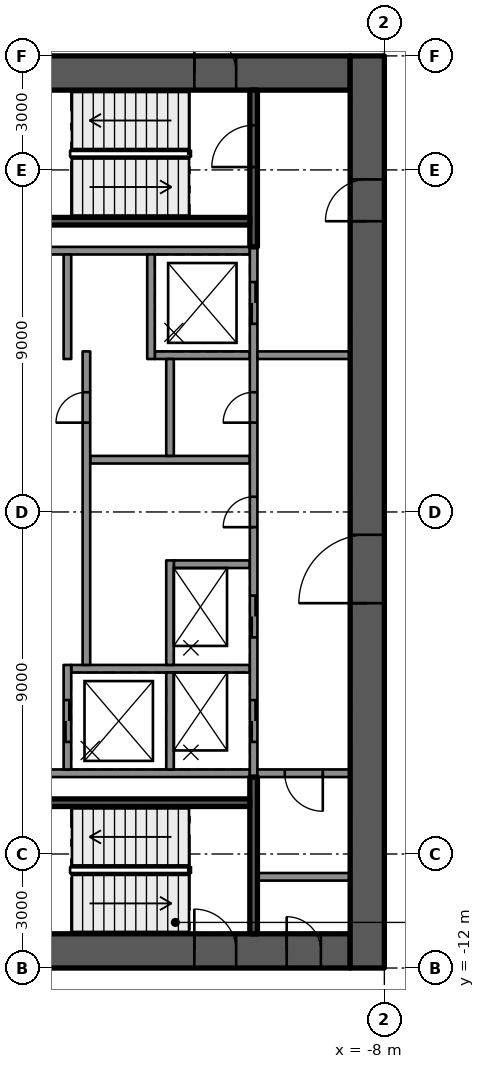
"""IFC4 building model, lengths in metres.
Left out: names, types, materials, properties, quantities, classifications, styles, units other than length and angle.
Written with IfcOpenShell. Run it as: python <this file> out.ifc"""

import sys

from ifc_helpers import new_model, si_unit, direction, frame, frame_2d, origin, place, context, subcontext, project, spatial, rectangle, extrude, element, fill, save


model = new_model("IFC4")
c1 = context("Model", 3, precision=1e-05, world=origin(), true_north=direction((0.0, 1.0)))
c2 = subcontext(c1, "Body", "Model", "MODEL_VIEW")
j1 = project(units=[si_unit("LENGTHUNIT", "METRE"), si_unit("PLANEANGLEUNIT", "RADIAN")], contexts=[c1])
p1 = place(None, origin())
s1 = spatial("IfcSite", under=j1, at=p1, CompositionType="ELEMENT")
p2 = place(p1, origin())
s2 = spatial("IfcBuilding", under=s1, at=p2, CompositionType="ELEMENT")
p3 = place(p2, frame((0.0, 0.0, 249.5)))
s3 = spatial("IfcBuildingStorey", under=s2, at=p3, CompositionType="ELEMENT", Elevation=249.5)
p4 = place(p3, frame((-18.1, 11.55, 0.0), z_axis=(0.0, 0.0, 1.0), x_axis=(1.0, 0.0, 0.0)))
e1 = element("IfcWall", 1, at=p4, inside=s3, PredefinedType="SHEAR", context=c2, shape_type="SweptSolid", body=[
    extrude(rectangle(XDim=9.2, YDim=0.9, at=frame_2d((4.6, 0.0))), origin(), (0.0, 0.0, 1.0), 4.0),
])
p5 = place(p4, frame((5.1, 0.0, 0.0)))
e2 = element("IfcOpeningElement", 2, at=p5, cuts=e1, PredefinedType="OPENING", context=c2, shape_type="SweptSolid", body=[
    extrude(rectangle(XDim=1.1, YDim=2.1, at=frame_2d((0.55, 1.05))), frame((0.0, 0.46, 0.0), z_axis=(0.0, -1.0, 0.0), x_axis=(1.0, 0.0, 0.0)), (0.0, 0.0, 1.0), 0.92),
])
p6 = place(p3, frame((-18.1, -11.55, 0.0), z_axis=(0.0, 0.0, 1.0), x_axis=(1.0, 0.0, 0.0)))
e3 = element("IfcWall", 3, at=p6, inside=s3, PredefinedType="SHEAR", context=c2, shape_type="SweptSolid", body=[
    extrude(rectangle(XDim=9.2, YDim=0.9, at=frame_2d((4.6, 0.0))), origin(), (0.0, 0.0, 1.0), 4.0),
])
p7 = place(p6, frame((5.1, 0.0, 0.0)))
e4 = element("IfcOpeningElement", 4, at=p7, cuts=e3, PredefinedType="OPENING", context=c2, shape_type="SweptSolid", body=[
    extrude(rectangle(XDim=1.1, YDim=2.1, at=frame_2d((0.55, 1.05))), frame((0.0, 0.46, 0.0), z_axis=(0.0, -1.0, 0.0), x_axis=(1.0, 0.0, 0.0)), (0.0, 0.0, 1.0), 0.92),
])
p8 = place(p6, frame((7.53, 0.0, 0.0)))
e5 = element("IfcOpeningElement", 5, at=p8, cuts=e3, PredefinedType="OPENING", context=c2, shape_type="SweptSolid", body=[
    extrude(rectangle(XDim=0.9, YDim=2.1, at=frame_2d((0.45, 1.05))), frame((0.0, 0.46, 0.0), z_axis=(0.0, -1.0, 0.0), x_axis=(1.0, 0.0, 0.0)), (0.0, 0.0, 1.0), 0.92),
])
p9 = place(p3, frame((-8.45, -12.0, 0.0), z_axis=(0.0, 0.0, 1.0), x_axis=(0.0, 1.0, 0.0)))
e6 = element("IfcWall", 6, at=p9, inside=s3, PredefinedType="SHEAR", context=c2, shape_type="SweptSolid", body=[
    extrude(rectangle(XDim=24.0, YDim=0.9, at=frame_2d((12.0, 0.0))), origin(), (0.0, 0.0, 1.0), 4.0),
])
p10 = place(p9, frame((9.6, 0.0, 0.0)))
e7 = element("IfcOpeningElement", 7, at=p10, cuts=e6, PredefinedType="OPENING", context=c2, shape_type="SweptSolid", body=[
    extrude(rectangle(XDim=1.8, YDim=2.1, at=frame_2d((0.9, 1.05))), frame((0.0, 0.46, 0.0), z_axis=(0.0, -1.0, 0.0), x_axis=(1.0, 0.0, 0.0)), (0.0, 0.0, 1.0), 0.92),
])
p11 = place(p9, frame((19.65, 0.0, 0.0)))
e8 = element("IfcOpeningElement", 8, at=p11, cuts=e6, PredefinedType="OPENING", context=c2, shape_type="SweptSolid", body=[
    extrude(rectangle(XDim=1.1, YDim=2.1, at=frame_2d((0.55, 1.05))), frame((0.0, 0.46, 0.0), z_axis=(0.0, -1.0, 0.0), x_axis=(1.0, 0.0, 0.0)), (0.0, 0.0, 1.0), 0.92),
])
for number, where, z_axis, x_axis in (
    (9, (-11.54, 6.875, 0.0), (0.0, 0.0, 1.0), (-1.0, 0.0, 0.0)),
    (10, (-11.54, -6.875, 0.0), (0.0, 0.0, 1.0), (-1.0, 0.0, 0.0)),
):
    element("IfcWall", number, at=place(p3, frame(where, z_axis=z_axis, x_axis=x_axis)), inside=s3, PredefinedType="SOLIDWALL", context=c2, shape_type="SweptSolid", body=[
        extrude(rectangle(XDim=6.56, YDim=0.2, at=frame_2d((3.28, 0.0))), origin(), (0.0, 0.0, 1.0), 3.58),
    ])
p12 = place(p3, frame((-11.54, -4.125, 0.0), z_axis=(0.0, 0.0, 1.0), x_axis=(-1.0, 0.0, 0.0)))
e11 = element("IfcWall", 11, at=p12, inside=s3, PredefinedType="SOLIDWALL", context=c2, shape_type="SweptSolid", body=[
    extrude(rectangle(XDim=4.7, YDim=0.2, at=frame_2d((2.35, 0.0))), origin(), (0.0, 0.0, 1.0), 3.58),
])
p13 = place(p3, frame((-11.54, -1.375, 0.0), z_axis=(0.0, 0.0, 1.0), x_axis=(-1.0, 0.0, 0.0)))
e12 = element("IfcWall", 12, at=p13, inside=s3, PredefinedType="SOLIDWALL", context=c2, shape_type="SweptSolid", body=[
    extrude(rectangle(XDim=2.0, YDim=0.2, at=frame_2d((1.0, 0.0))), origin(), (0.0, 0.0, 1.0), 3.58),
])
p14 = place(p3, frame((-11.54, 1.375, 0.0), z_axis=(0.0, 0.0, 1.0), x_axis=(-1.0, 0.0, 0.0)))
e13 = element("IfcWall", 13, at=p14, inside=s3, PredefinedType="SOLIDWALL", context=c2, shape_type="SweptSolid", body=[
    extrude(rectangle(XDim=4.2, YDim=0.2, at=frame_2d((2.1, 0.0))), origin(), (0.0, 0.0, 1.0), 3.58),
])
p15 = place(p3, frame((-11.54, 4.125, 0.0), z_axis=(0.0, 0.0, 1.0), x_axis=(-1.0, 0.0, 0.0)))
e14 = element("IfcWall", 14, at=p15, inside=s3, PredefinedType="SOLIDWALL", context=c2, shape_type="SweptSolid", body=[
    extrude(rectangle(XDim=2.5, YDim=0.2, at=frame_2d((1.25, 0.0))), origin(), (0.0, 0.0, 1.0), 3.58),
])
p16 = place(p3, frame((-11.44, -6.975, 0.0), z_axis=(0.0, 0.0, 1.0), x_axis=(0.0, 1.0, 0.0)))
e15 = element("IfcWall", 15, at=p16, inside=s3, PredefinedType="SOLIDWALL", context=c2, shape_type="SweptSolid", body=[
    extrude(rectangle(XDim=13.95, YDim=0.2, at=frame_2d((6.975, 0.0))), origin(), (0.0, 0.0, 1.0), 3.58),
])
p17 = place(p16, frame((0.925, 0.0, 0.0)))
e16 = element("IfcOpeningElement", 16, at=p17, cuts=e15, PredefinedType="OPENING", context=c2, shape_type="SweptSolid", body=[
    extrude(rectangle(XDim=1.1, YDim=2.1, at=frame_2d((0.55, 1.05))), frame((0.0, 0.11, 0.0), z_axis=(0.0, -1.0, 0.0), x_axis=(1.0, 0.0, 0.0)), (0.0, 0.0, 1.0), 0.22),
])
p18 = place(p16, frame((3.675, 0.0, 0.0)))
e17 = element("IfcOpeningElement", 17, at=p18, cuts=e15, PredefinedType="OPENING", context=c2, shape_type="SweptSolid", body=[
    extrude(rectangle(XDim=1.1, YDim=2.1, at=frame_2d((0.55, 1.05))), frame((0.0, 0.11, 0.0), z_axis=(0.0, -1.0, 0.0), x_axis=(1.0, 0.0, 0.0)), (0.0, 0.0, 1.0), 0.22),
])
p19 = place(p16, frame((11.925, 0.0, 0.0)))
e18 = element("IfcOpeningElement", 18, at=p19, cuts=e15, PredefinedType="OPENING", context=c2, shape_type="SweptSolid", body=[
    extrude(rectangle(XDim=1.1, YDim=2.1, at=frame_2d((0.55, 1.05))), frame((0.0, 0.11, 0.0), z_axis=(0.0, -1.0, 0.0), x_axis=(1.0, 0.0, 0.0)), (0.0, 0.0, 1.0), 0.22),
])
p20 = place(p16, frame((6.575, 0.0, 0.0)))
e19 = element("IfcOpeningElement", 19, at=p20, cuts=e15, PredefinedType="OPENING", context=c2, shape_type="SweptSolid", body=[
    extrude(rectangle(XDim=0.8, YDim=2.1, at=frame_2d((0.4, 1.05))), frame((0.0, 0.11, 0.0), z_axis=(0.0, -1.0, 0.0), x_axis=(1.0, 0.0, 0.0)), (0.0, 0.0, 1.0), 0.22),
])
p21 = place(p16, frame((9.325, 0.0, 0.0)))
e20 = element("IfcOpeningElement", 20, at=p21, cuts=e15, PredefinedType="OPENING", context=c2, shape_type="SweptSolid", body=[
    extrude(rectangle(XDim=0.8, YDim=2.1, at=frame_2d((0.4, 1.05))), frame((0.0, 0.11, 0.0), z_axis=(0.0, -1.0, 0.0), x_axis=(1.0, 0.0, 0.0)), (0.0, 0.0, 1.0), 0.22),
])
p22 = place(p3, frame((-13.64, -6.775, 0.0), z_axis=(0.0, 0.0, 1.0), x_axis=(0.0, 1.0, 0.0)))
e21 = element("IfcWall", 21, at=p22, inside=s3, PredefinedType="SOLIDWALL", context=c2, shape_type="SweptSolid", body=[
    extrude(rectangle(XDim=2.55, YDim=0.2, at=frame_2d((1.275, 0.0))), origin(), (0.0, 0.0, 1.0), 3.58),
])
p23 = place(p3, frame((-13.64, -4.025, 0.0), z_axis=(0.0, 0.0, 1.0), x_axis=(0.0, 1.0, 0.0)))
e22 = element("IfcWall", 22, at=p23, inside=s3, PredefinedType="SOLIDWALL", context=c2, shape_type="SweptSolid", body=[
    extrude(rectangle(XDim=2.75, YDim=0.2, at=frame_2d((1.375, 0.0))), origin(), (0.0, 0.0, 1.0), 3.58),
])
p24 = place(p3, frame((-13.64, 1.475, 0.0), z_axis=(0.0, 0.0, 1.0), x_axis=(0.0, 1.0, 0.0)))
e23 = element("IfcWall", 23, at=p24, inside=s3, PredefinedType="SOLIDWALL", context=c2, shape_type="SweptSolid", body=[
    extrude(rectangle(XDim=2.55, YDim=0.2, at=frame_2d((1.275, 0.0))), origin(), (0.0, 0.0, 1.0), 3.58),
])
p25 = place(p3, frame((-14.14, 4.025, 0.0), z_axis=(0.0, 0.0, 1.0), x_axis=(0.0, 1.0, 0.0)))
e24 = element("IfcWall", 24, at=p25, inside=s3, PredefinedType="SOLIDWALL", context=c2, shape_type="SweptSolid", body=[
    extrude(rectangle(XDim=2.75, YDim=0.2, at=frame_2d((1.375, 0.0))), origin(), (0.0, 0.0, 1.0), 3.58),
])
p26 = place(p3, frame((-16.34, -6.775, 0.0), z_axis=(0.0, 0.0, 1.0), x_axis=(0.0, 1.0, 0.0)))
e25 = element("IfcWall", 25, at=p26, inside=s3, PredefinedType="SOLIDWALL", context=c2, shape_type="SweptSolid", body=[
    extrude(rectangle(XDim=2.75, YDim=0.2, at=frame_2d((1.375, 0.0))), origin(), (0.0, 0.0, 1.0), 3.58),
])
p27 = place(p26, frame((0.725, 0.0, 0.0)))
e26 = element("IfcOpeningElement", 26, at=p27, cuts=e25, PredefinedType="OPENING", context=c2, shape_type="SweptSolid", body=[
    extrude(rectangle(XDim=1.1, YDim=2.1, at=frame_2d((0.55, 1.05))), frame((0.0, 0.11, 0.0), z_axis=(0.0, -1.0, 0.0), x_axis=(1.0, 0.0, 0.0)), (0.0, 0.0, 1.0), 0.22),
])
p28 = place(p3, frame((-15.84, -4.025, 0.0), z_axis=(0.0, 0.0, 1.0), x_axis=(0.0, 1.0, 0.0)))
e27 = element("IfcWall", 27, at=p28, inside=s3, PredefinedType="SOLIDWALL", context=c2, shape_type="SweptSolid", body=[
    extrude(rectangle(XDim=8.25, YDim=0.2, at=frame_2d((4.125, 0.0))), origin(), (0.0, 0.0, 1.0), 3.58),
])
p29 = place(p28, frame((6.375, 0.0, 0.0)))
e28 = element("IfcOpeningElement", 28, at=p29, cuts=e27, PredefinedType="OPENING", context=c2, shape_type="SweptSolid", body=[
    extrude(rectangle(XDim=0.8, YDim=2.1, at=frame_2d((0.4, 1.05))), frame((0.0, 0.11, 0.0), z_axis=(0.0, -1.0, 0.0), x_axis=(1.0, 0.0, 0.0)), (0.0, 0.0, 1.0), 0.22),
])
p30 = place(p3, frame((-16.34, 4.025, 0.0), z_axis=(0.0, 0.0, 1.0), x_axis=(0.0, 1.0, 0.0)))
e29 = element("IfcWall", 29, at=p30, inside=s3, PredefinedType="SOLIDWALL", context=c2, shape_type="SweptSolid", body=[
    extrude(rectangle(XDim=2.75, YDim=0.2, at=frame_2d((1.375, 0.0))), origin(), (0.0, 0.0, 1.0), 3.58),
])
p31 = place(p3, frame((-11.44, 6.975, 0.0), z_axis=(0.0, 0.0, 1.0), x_axis=(0.0, 1.0, 0.0)))
e30 = element("IfcWall", 30, at=p31, inside=s3, PredefinedType="SOLIDWALL", context=c2, shape_type="SweptSolid", body=[
    extrude(rectangle(XDim=4.125, YDim=0.2, at=frame_2d((2.062, 0.0))), origin(), (0.0, 0.0, 1.0), 3.58),
])
p32 = place(p31, frame((2.1, 0.0, 0.0)))
e31 = element("IfcOpeningElement", 31, at=p32, cuts=e30, PredefinedType="OPENING", context=c2, shape_type="SweptSolid", body=[
    extrude(rectangle(XDim=1.1, YDim=2.1, at=frame_2d((0.55, 1.05))), frame((0.0, 0.11, 0.0), z_axis=(0.0, -1.0, 0.0), x_axis=(1.0, 0.0, 0.0)), (0.0, 0.0, 1.0), 0.22),
])
p33 = place(p3, frame((-11.54, 7.65, 0.0), z_axis=(0.0, 0.0, 1.0), x_axis=(-1.0, 0.0, 0.0)))
e32 = element("IfcWall", 32, at=p33, inside=s3, PredefinedType="SOLIDWALL", context=c2, shape_type="SweptSolid", body=[
    extrude(rectangle(XDim=6.56, YDim=0.2, at=frame_2d((3.28, 0.0))), origin(), (0.0, 0.0, 1.0), 3.58),
])
p34 = place(p3, frame((-11.44, -11.1, 0.0), z_axis=(0.0, 0.0, 1.0), x_axis=(0.0, 1.0, 0.0)))
e33 = element("IfcWall", 33, at=p34, inside=s3, PredefinedType="SOLIDWALL", context=c2, shape_type="SweptSolid", body=[
    extrude(rectangle(XDim=4.125, YDim=0.2, at=frame_2d((2.062, 0.0))), origin(), (0.0, 0.0, 1.0), 3.58),
])
p35 = place(p3, frame((-11.54, -7.65, 0.0), z_axis=(0.0, 0.0, 1.0), x_axis=(-1.0, 0.0, 0.0)))
e34 = element("IfcWall", 34, at=p35, inside=s3, PredefinedType="SOLIDWALL", context=c2, shape_type="SweptSolid", body=[
    extrude(rectangle(XDim=6.56, YDim=0.2, at=frame_2d((3.28, 0.0))), origin(), (0.0, 0.0, 1.0), 3.58),
])
p36 = place(p3, frame((-8.9, 4.125, 0.0), z_axis=(0.0, 0.0, 1.0), x_axis=(-1.0, 0.0, 0.0)))
e35 = element("IfcWall", 35, at=p36, inside=s3, PredefinedType="PARTITIONING", context=c2, shape_type="SweptSolid", body=[
    extrude(rectangle(XDim=2.44, YDim=0.2, at=frame_2d((1.22, 0.0))), origin(), (0.0, 0.0, 1.0), 3.58),
])
p37 = place(p3, frame((-8.9, -6.875, 0.0), z_axis=(0.0, 0.0, 1.0), x_axis=(-1.0, 0.0, 0.0)))
e36 = element("IfcWall", 36, at=p37, inside=s3, PredefinedType="PARTITIONING", context=c2, shape_type="SweptSolid", body=[
    extrude(rectangle(XDim=2.44, YDim=0.2, at=frame_2d((1.22, 0.0))), origin(), (0.0, 0.0, 1.0), 3.58),
])
p38 = place(p37, frame((0.72, 0.0, 0.0)))
e37 = element("IfcOpeningElement", 37, at=p38, cuts=e36, PredefinedType="OPENING", context=c2, shape_type="SweptSolid", body=[
    extrude(rectangle(XDim=1.0, YDim=2.1, at=frame_2d((0.5, 1.05))), frame((0.0, 0.11, 0.0), z_axis=(0.0, -1.0, 0.0), x_axis=(1.0, 0.0, 0.0)), (0.0, 0.0, 1.0), 0.22),
])
p39 = place(p3, frame((-8.9, -9.6, 0.0), z_axis=(0.0, 0.0, 1.0), x_axis=(-1.0, 0.0, 0.0)))
e38 = element("IfcWall", 38, at=p39, inside=s3, PredefinedType="PARTITIONING", context=c2, shape_type="SweptSolid", body=[
    extrude(rectangle(XDim=2.44, YDim=0.2, at=frame_2d((1.22, 0.0))), origin(), (0.0, 0.0, 1.0), 3.58),
])
p40 = place(p17, origin())
e39 = element("IfcDoor", 39, at=p40, inside=s3, OperationType="DOUBLE_DOOR_SLIDING", PredefinedType="DOOR", context=c2, shape_type="SweptSolid", body=[
    extrude(rectangle(XDim=1.1, YDim=2.1, at=frame_2d((0.55, 1.05))), frame((0.0, 0.025, 0.0), z_axis=(0.0, -1.0, 0.0), x_axis=(1.0, 0.0, 0.0)), (0.0, 0.0, 1.0), 0.05),
])
fill(e16, e39)
p41 = place(p27, origin())
e40 = element("IfcDoor", 40, at=p41, inside=s3, OperationType="DOUBLE_DOOR_SLIDING", PredefinedType="DOOR", context=c2, shape_type="SweptSolid", body=[
    extrude(rectangle(XDim=1.1, YDim=2.1, at=frame_2d((0.55, 1.05))), frame((0.0, 0.025, 0.0), z_axis=(0.0, -1.0, 0.0), x_axis=(1.0, 0.0, 0.0)), (0.0, 0.0, 1.0), 0.05),
])
fill(e26, e40)
p42 = place(p18, origin())
e41 = element("IfcDoor", 41, at=p42, inside=s3, OperationType="DOUBLE_DOOR_SLIDING", PredefinedType="DOOR", context=c2, shape_type="SweptSolid", body=[
    extrude(rectangle(XDim=1.1, YDim=2.1, at=frame_2d((0.55, 1.05))), frame((0.0, 0.025, 0.0), z_axis=(0.0, -1.0, 0.0), x_axis=(1.0, 0.0, 0.0)), (0.0, 0.0, 1.0), 0.05),
])
fill(e17, e41)
p43 = place(p19, origin())
e42 = element("IfcDoor", 42, at=p43, inside=s3, OperationType="DOUBLE_DOOR_SLIDING", PredefinedType="DOOR", context=c2, shape_type="SweptSolid", body=[
    extrude(rectangle(XDim=1.1, YDim=2.1, at=frame_2d((0.55, 1.05))), frame((0.0, 0.025, 0.0), z_axis=(0.0, -1.0, 0.0), x_axis=(1.0, 0.0, 0.0)), (0.0, 0.0, 1.0), 0.05),
])
fill(e18, e42)
p44 = place(p20, origin())
e43 = element("IfcDoor", 43, at=p44, inside=s3, OperationType="SINGLE_SWING_RIGHT", PredefinedType="DOOR", context=c2, shape_type="SweptSolid", body=[
    extrude(rectangle(XDim=0.8, YDim=2.1, at=frame_2d((0.4, 1.05))), frame((0.0, 0.025, 0.0), z_axis=(0.0, -1.0, 0.0), x_axis=(1.0, 0.0, 0.0)), (0.0, 0.0, 1.0), 0.05),
])
fill(e19, e43)
p45 = place(p21, origin())
e44 = element("IfcDoor", 44, at=p45, inside=s3, OperationType="SINGLE_SWING_LEFT", PredefinedType="DOOR", context=c2, shape_type="SweptSolid", body=[
    extrude(rectangle(XDim=0.8, YDim=2.1, at=frame_2d((0.4, 1.05))), frame((0.0, 0.025, 0.0), z_axis=(0.0, -1.0, 0.0), x_axis=(1.0, 0.0, 0.0)), (0.0, 0.0, 1.0), 0.05),
])
fill(e20, e44)
p46 = place(p29, origin())
e45 = element("IfcDoor", 45, at=p46, inside=s3, OperationType="SINGLE_SWING_LEFT", PredefinedType="DOOR", context=c2, shape_type="SweptSolid", body=[
    extrude(rectangle(XDim=0.8, YDim=2.1, at=frame_2d((0.4, 1.05))), frame((0.0, 0.025, 0.0), z_axis=(0.0, -1.0, 0.0), x_axis=(1.0, 0.0, 0.0)), (0.0, 0.0, 1.0), 0.05),
])
fill(e28, e45)
p47 = place(p10, origin())
e46 = element("IfcDoor", 46, at=p47, inside=s3, OperationType="SINGLE_SWING_LEFT", PredefinedType="DOOR", context=c2, shape_type="SweptSolid", body=[
    extrude(rectangle(XDim=1.8, YDim=2.1, at=frame_2d((0.9, 1.05))), frame((0.0, 0.025, 0.0), z_axis=(0.0, -1.0, 0.0), x_axis=(1.0, 0.0, 0.0)), (0.0, 0.0, 1.0), 0.05),
])
fill(e7, e46)
p48 = place(p11, origin())
e47 = element("IfcDoor", 47, at=p48, inside=s3, OperationType="SINGLE_SWING_RIGHT", PredefinedType="DOOR", context=c2, shape_type="SweptSolid", body=[
    extrude(rectangle(XDim=1.1, YDim=2.1, at=frame_2d((0.55, 1.05))), frame((0.0, 0.025, 0.0), z_axis=(0.0, -1.0, 0.0), x_axis=(1.0, 0.0, 0.0)), (0.0, 0.0, 1.0), 0.05),
])
fill(e8, e47)
p49 = place(p5, origin())
e48 = element("IfcDoor", 48, at=p49, inside=s3, OperationType="SINGLE_SWING_RIGHT", PredefinedType="DOOR", context=c2, shape_type="SweptSolid", body=[
    extrude(rectangle(XDim=1.1, YDim=2.1, at=frame_2d((0.55, 1.05))), frame((0.0, 0.025, 0.0), z_axis=(0.0, -1.0, 0.0), x_axis=(1.0, 0.0, 0.0)), (0.0, 0.0, 1.0), 0.05),
])
fill(e2, e48)
p50 = place(p7, origin())
e49 = element("IfcDoor", 49, at=p50, inside=s3, OperationType="SINGLE_SWING_RIGHT", PredefinedType="DOOR", context=c2, shape_type="SweptSolid", body=[
    extrude(rectangle(XDim=1.1, YDim=2.1, at=frame_2d((0.55, 1.05))), frame((0.0, 0.025, 0.0), z_axis=(0.0, -1.0, 0.0), x_axis=(1.0, 0.0, 0.0)), (0.0, 0.0, 1.0), 0.05),
])
fill(e4, e49)
p51 = place(p32, origin())
e50 = element("IfcDoor", 50, at=p51, inside=s3, OperationType="SINGLE_SWING_RIGHT", PredefinedType="DOOR", context=c2, shape_type="SweptSolid", body=[
    extrude(rectangle(XDim=1.1, YDim=2.1, at=frame_2d((0.55, 1.05))), frame((0.0, 0.025, 0.0), z_axis=(0.0, -1.0, 0.0), x_axis=(1.0, 0.0, 0.0)), (0.0, 0.0, 1.0), 0.05),
])
fill(e31, e50)
p52 = place(p8, origin())
e51 = element("IfcDoor", 51, at=p52, inside=s3, OperationType="SINGLE_SWING_RIGHT", PredefinedType="DOOR", context=c2, shape_type="SweptSolid", body=[
    extrude(rectangle(XDim=0.9, YDim=2.1, at=frame_2d((0.45, 1.05))), frame((0.0, 0.025, 0.0), z_axis=(0.0, -1.0, 0.0), x_axis=(1.0, 0.0, 0.0)), (0.0, 0.0, 1.0), 0.05),
])
fill(e5, e51)
p53 = place(p38, origin())
e52 = element("IfcDoor", 52, at=p53, inside=s3, OperationType="SINGLE_SWING_RIGHT", PredefinedType="DOOR", context=c2, shape_type="SweptSolid", body=[
    extrude(rectangle(XDim=1.0, YDim=2.1, at=frame_2d((0.5, 1.05))), frame((0.0, 0.025, 0.0), z_axis=(0.0, -1.0, 0.0), x_axis=(1.0, 0.0, 0.0)), (0.0, 0.0, 1.0), 0.05),
])
fill(e37, e52)
save(model, sys.argv[1])
